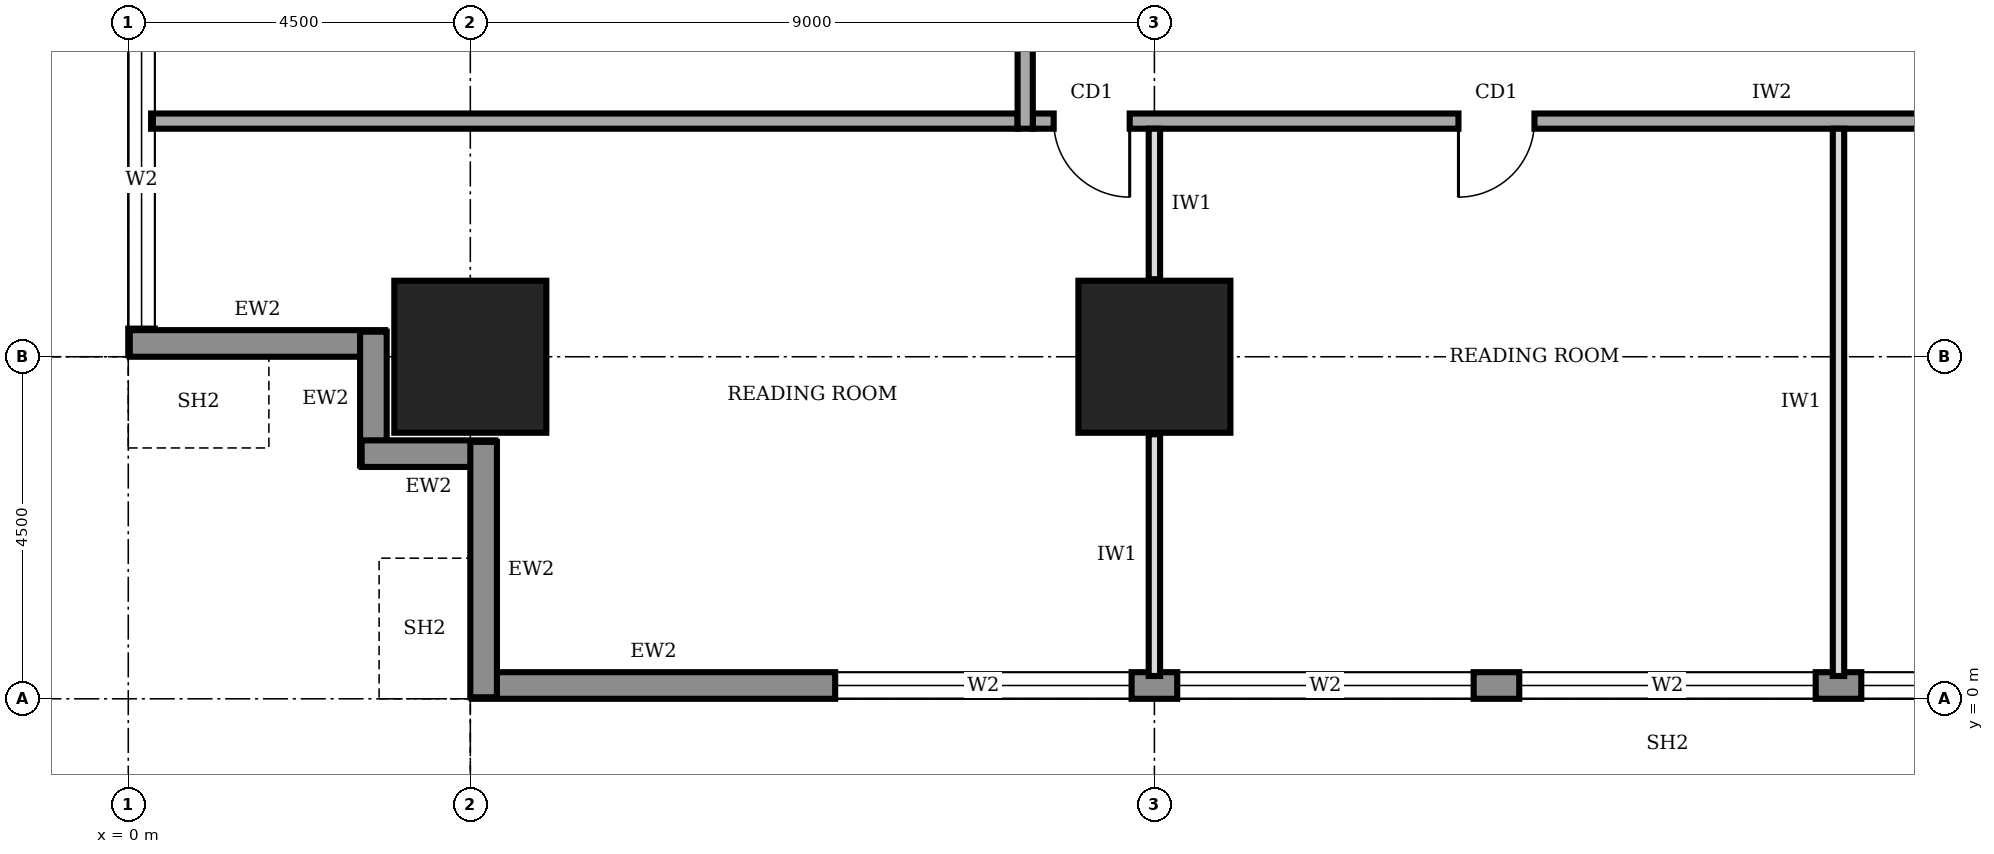
"""IFC4 building model, lengths in metres.
Left out: names, types, materials, properties, quantities, classifications, styles, units other than length and angle.
Written with IfcOpenShell. Run it as: python <this file> out.ifc"""

import sys

from ifc_helpers import new_model, si_unit, direction, frame, frame_2d, origin, origin_2d, place, context, subcontext, project, spatial, rectangle, extrude, element, fill, save


model = new_model("IFC4")
c1 = context("Model", 3, precision=1e-05, world=origin(), true_north=direction((0.0, 1.0)))
c2 = subcontext(c1, "Body", "Model", "MODEL_VIEW")
j1 = project(units=[si_unit("LENGTHUNIT", "METRE"), si_unit("PLANEANGLEUNIT", "RADIAN")], contexts=[c1])
p1 = place(None, origin())
s1 = spatial("IfcSite", under=j1, at=p1, CompositionType="ELEMENT")
p2 = place(p1, origin())
s2 = spatial("IfcBuilding", under=s1, at=p2, CompositionType="ELEMENT")
p3 = place(p2, frame((0.0, 0.0, 73.0)))
s3 = spatial("IfcBuildingStorey", under=s2, at=p3, CompositionType="ELEMENT", Elevation=73.0)
for number, where, z_axis, x_axis in (
    (1, (4.5, 4.5, 0.0), (0.0, 0.0, 1.0), (1.0, 0.0, 0.0)),
    (2, (13.5, 4.5, 0.0), (0.0, 0.0, 1.0), (1.0, 0.0, 0.0)),
):
    element("IfcColumn", number, at=place(p3, frame(where, z_axis=z_axis, x_axis=x_axis)), inside=s3, PredefinedType="COLUMN", context=c2, shape_type="SweptSolid", body=[
        extrude(rectangle(XDim=2.0, YDim=2.0, at=origin_2d()), origin(), (0.0, 0.0, 1.0), 4.0),
    ])
p4 = place(p3, frame((4.52, 0.175, 0.0), z_axis=(0.0, 0.0, 1.0), x_axis=(1.0, 0.0, 0.0)))
e3 = element("IfcWall", 3, at=p4, inside=s3, PredefinedType="STANDARD", context=c2, shape_type="SweptSolid", body=[
    extrude(rectangle(XDim=31.46, YDim=0.35, at=frame_2d((15.73, 0.0))), origin(), (0.0, 0.0, 1.0), 3.75),
])
p5 = place(p4, frame((4.78, 0.0, 0.6)))
e4 = element("IfcOpeningElement", 4, at=p5, cuts=e3, PredefinedType="OPENING", context=c2, shape_type="SweptSolid", body=[
    extrude(rectangle(XDim=3.9, YDim=2.6, at=frame_2d((1.95, 1.3))), frame((0.0, 0.185, 0.0), z_axis=(0.0, -1.0, 0.0), x_axis=(1.0, 0.0, 0.0)), (0.0, 0.0, 1.0), 0.37),
])
p6 = place(p4, frame((9.28, 0.0, 0.6)))
e5 = element("IfcOpeningElement", 5, at=p6, cuts=e3, PredefinedType="OPENING", context=c2, shape_type="SweptSolid", body=[
    extrude(rectangle(XDim=3.9, YDim=2.6, at=frame_2d((1.95, 1.3))), frame((0.0, 0.185, 0.0), z_axis=(0.0, -1.0, 0.0), x_axis=(1.0, 0.0, 0.0)), (0.0, 0.0, 1.0), 0.37),
])
p7 = place(p4, frame((13.78, 0.0, 0.6)))
e6 = element("IfcOpeningElement", 6, at=p7, cuts=e3, PredefinedType="OPENING", context=c2, shape_type="SweptSolid", body=[
    extrude(rectangle(XDim=3.9, YDim=2.6, at=frame_2d((1.95, 1.3))), frame((0.0, 0.185, 0.0), z_axis=(0.0, -1.0, 0.0), x_axis=(1.0, 0.0, 0.0)), (0.0, 0.0, 1.0), 0.37),
])
p8 = place(p4, frame((18.28, 0.0, 0.6)))
e7 = element("IfcOpeningElement", 7, at=p8, cuts=e3, PredefinedType="OPENING", context=c2, shape_type="SweptSolid", body=[
    extrude(rectangle(XDim=3.9, YDim=2.6, at=frame_2d((1.95, 1.3))), frame((0.0, 0.185, 0.0), z_axis=(0.0, -1.0, 0.0), x_axis=(1.0, 0.0, 0.0)), (0.0, 0.0, 1.0), 0.37),
])
p9 = place(p4, frame((22.78, 0.0, 0.6)))
e8 = element("IfcOpeningElement", 8, at=p9, cuts=e3, PredefinedType="OPENING", context=c2, shape_type="SweptSolid", body=[
    extrude(rectangle(XDim=3.9, YDim=2.6, at=frame_2d((1.95, 1.3))), frame((0.0, 0.185, 0.0), z_axis=(0.0, -1.0, 0.0), x_axis=(1.0, 0.0, 0.0)), (0.0, 0.0, 1.0), 0.37),
])
p10 = place(p4, frame((27.21, 0.0, 0.6)))
e9 = element("IfcOpeningElement", 9, at=p10, cuts=e3, PredefinedType="OPENING", context=c2, shape_type="SweptSolid", body=[
    extrude(rectangle(XDim=3.9, YDim=2.6, at=frame_2d((1.95, 1.3))), frame((0.0, 0.185, 0.0), z_axis=(0.0, -1.0, 0.0), x_axis=(1.0, 0.0, 0.0)), (0.0, 0.0, 1.0), 0.37),
])
p11 = place(p3, frame((0.175, 35.98, 0.0), z_axis=(0.0, 0.0, 1.0), x_axis=(0.0, -1.0, 0.0)))
e10 = element("IfcWall", 10, at=p11, inside=s3, PredefinedType="STANDARD", context=c2, shape_type="SweptSolid", body=[
    extrude(rectangle(XDim=31.46, YDim=0.35, at=frame_2d((15.73, 0.0))), origin(), (0.0, 0.0, 1.0), 3.75),
])
p12 = place(p11, frame((27.21, 0.0, 0.6)))
e11 = element("IfcOpeningElement", 11, at=p12, cuts=e10, PredefinedType="OPENING", context=c2, shape_type="SweptSolid", body=[
    extrude(rectangle(XDim=3.9, YDim=2.6, at=frame_2d((1.95, 1.3))), frame((0.0, 0.185, 0.0), z_axis=(0.0, -1.0, 0.0), x_axis=(1.0, 0.0, 0.0)), (0.0, 0.0, 1.0), 0.37),
])
p13 = place(p11, frame((22.78, 0.0, 0.6)))
e12 = element("IfcOpeningElement", 12, at=p13, cuts=e10, PredefinedType="OPENING", context=c2, shape_type="SweptSolid", body=[
    extrude(rectangle(XDim=3.9, YDim=2.6, at=frame_2d((1.95, 1.3))), frame((0.0, 0.185, 0.0), z_axis=(0.0, -1.0, 0.0), x_axis=(1.0, 0.0, 0.0)), (0.0, 0.0, 1.0), 0.37),
])
p14 = place(p11, frame((18.28, 0.0, 0.6)))
e13 = element("IfcOpeningElement", 13, at=p14, cuts=e10, PredefinedType="OPENING", context=c2, shape_type="SweptSolid", body=[
    extrude(rectangle(XDim=3.9, YDim=2.6, at=frame_2d((1.95, 1.3))), frame((0.0, 0.185, 0.0), z_axis=(0.0, -1.0, 0.0), x_axis=(1.0, 0.0, 0.0)), (0.0, 0.0, 1.0), 0.37),
])
p15 = place(p11, frame((13.78, 0.0, 0.6)))
e14 = element("IfcOpeningElement", 14, at=p15, cuts=e10, PredefinedType="OPENING", context=c2, shape_type="SweptSolid", body=[
    extrude(rectangle(XDim=3.9, YDim=2.6, at=frame_2d((1.95, 1.3))), frame((0.0, 0.185, 0.0), z_axis=(0.0, -1.0, 0.0), x_axis=(1.0, 0.0, 0.0)), (0.0, 0.0, 1.0), 0.37),
])
p16 = place(p11, frame((9.28, 0.0, 0.6)))
e15 = element("IfcOpeningElement", 15, at=p16, cuts=e10, PredefinedType="OPENING", context=c2, shape_type="SweptSolid", body=[
    extrude(rectangle(XDim=3.9, YDim=2.6, at=frame_2d((1.95, 1.3))), frame((0.0, 0.185, 0.0), z_axis=(0.0, -1.0, 0.0), x_axis=(1.0, 0.0, 0.0)), (0.0, 0.0, 1.0), 0.37),
])
p17 = place(p11, frame((4.78, 0.0, 0.6)))
e16 = element("IfcOpeningElement", 16, at=p17, cuts=e10, PredefinedType="OPENING", context=c2, shape_type="SweptSolid", body=[
    extrude(rectangle(XDim=3.9, YDim=2.6, at=frame_2d((1.95, 1.3))), frame((0.0, 0.185, 0.0), z_axis=(0.0, -1.0, 0.0), x_axis=(1.0, 0.0, 0.0)), (0.0, 0.0, 1.0), 0.37),
])
p18 = place(p3, frame((0.02, 4.675, 0.0), z_axis=(0.0, 0.0, 1.0), x_axis=(1.0, 0.0, 0.0)))
e17 = element("IfcWall", 17, at=p18, inside=s3, PredefinedType="STANDARD", context=c2, shape_type="SweptSolid", body=[
    extrude(rectangle(XDim=3.36, YDim=0.35, at=frame_2d((1.68, 0.0))), origin(), (0.0, 0.0, 1.0), 2.75),
])
for number, where, z_axis, x_axis in (
    (18, (3.225, 4.83, 0.0), (0.0, 0.0, 1.0), (0.0, -1.0, 0.0)),
    (19, (3.07, 3.225, 0.0), (0.0, 0.0, 1.0), (1.0, 0.0, 0.0)),
):
    element("IfcWall", number, at=place(p3, frame(where, z_axis=z_axis, x_axis=x_axis)), inside=s3, PredefinedType="STANDARD", context=c2, shape_type="SweptSolid", body=[
        extrude(rectangle(XDim=1.76, YDim=0.35, at=frame_2d((0.88, 0.0))), origin(), (0.0, 0.0, 1.0), 3.75),
    ])
p19 = place(p3, frame((4.675, 3.38, 0.0), z_axis=(0.0, 0.0, 1.0), x_axis=(0.0, -1.0, 0.0)))
e20 = element("IfcWall", 20, at=p19, inside=s3, PredefinedType="STANDARD", context=c2, shape_type="SweptSolid", body=[
    extrude(rectangle(XDim=3.36, YDim=0.35, at=frame_2d((1.68, 0.0))), origin(), (0.0, 0.0, 1.0), 2.75),
])
p20 = place(p3, frame((11.9, 7.6, 0.0), z_axis=(0.0, 0.0, 1.0), x_axis=(1.0, 0.0, 0.0)))
e21 = element("IfcWall", 21, at=p20, inside=s3, PredefinedType="SOLIDWALL", context=c2, shape_type="SweptSolid", body=[
    extrude(rectangle(XDim=16.9, YDim=0.2, at=frame_2d((8.45, 0.0))), origin(), (0.0, 0.0, 1.0), 3.75),
])
p21 = place(p20, frame((0.275, 0.0, 0.0)))
e22 = element("IfcOpeningElement", 22, at=p21, cuts=e21, PredefinedType="OPENING", context=c2, shape_type="SweptSolid", body=[
    extrude(rectangle(XDim=1.0, YDim=2.1, at=frame_2d((0.5, 1.05))), frame((0.0, 0.11, 0.0), z_axis=(0.0, -1.0, 0.0), x_axis=(1.0, 0.0, 0.0)), (0.0, 0.0, 1.0), 0.22),
])
p22 = place(p20, frame((5.6, 0.0, 0.0)))
e23 = element("IfcOpeningElement", 23, at=p22, cuts=e21, PredefinedType="OPENING", context=c2, shape_type="SweptSolid", body=[
    extrude(rectangle(XDim=1.0, YDim=2.1, at=frame_2d((0.5, 1.05))), frame((0.0, 0.11, 0.0), z_axis=(0.0, -1.0, 0.0), x_axis=(1.0, 0.0, 0.0)), (0.0, 0.0, 1.0), 0.22),
])
p23 = place(p20, frame((12.85, 0.0, 0.0)))
e24 = element("IfcOpeningElement", 24, at=p23, cuts=e21, PredefinedType="OPENING", context=c2, shape_type="SweptSolid", body=[
    extrude(rectangle(XDim=1.8, YDim=2.1, at=frame_2d((0.9, 1.05))), frame((0.0, 0.11, 0.0), z_axis=(0.0, -1.0, 0.0), x_axis=(1.0, 0.0, 0.0)), (0.0, 0.0, 1.0), 0.22),
])
p24 = place(p3, frame((11.8, 32.8, 0.0), z_axis=(0.0, 0.0, 1.0), x_axis=(0.0, -1.0, 0.0)))
e25 = element("IfcWall", 25, at=p24, inside=s3, PredefinedType="SOLIDWALL", context=c2, shape_type="SweptSolid", body=[
    extrude(rectangle(XDim=25.3, YDim=0.2, at=frame_2d((12.65, 0.0))), origin(), (0.0, 0.0, 1.0), 3.75),
])
p25 = place(p24, frame((21.8, 0.0, 0.0)))
e26 = element("IfcOpeningElement", 26, at=p25, cuts=e25, PredefinedType="OPENING", context=c2, shape_type="SweptSolid", body=[
    extrude(rectangle(XDim=1.0, YDim=2.1, at=frame_2d((0.5, 1.05))), frame((0.0, 0.11, 0.0), z_axis=(0.0, -1.0, 0.0), x_axis=(1.0, 0.0, 0.0)), (0.0, 0.0, 1.0), 0.22),
])
p26 = place(p24, frame((17.65, 0.0, 0.0)))
e27 = element("IfcOpeningElement", 27, at=p26, cuts=e25, PredefinedType="OPENING", context=c2, shape_type="SweptSolid", body=[
    extrude(rectangle(XDim=0.9, YDim=2.1, at=frame_2d((0.45, 1.05))), frame((0.0, 0.11, 0.0), z_axis=(0.0, -1.0, 0.0), x_axis=(1.0, 0.0, 0.0)), (0.0, 0.0, 1.0), 0.22),
])
p27 = place(p24, frame((14.45, 0.0, 0.0)))
e28 = element("IfcOpeningElement", 28, at=p27, cuts=e25, PredefinedType="OPENING", context=c2, shape_type="SweptSolid", body=[
    extrude(rectangle(XDim=0.9, YDim=2.1, at=frame_2d((0.45, 1.05))), frame((0.0, 0.11, 0.0), z_axis=(0.0, -1.0, 0.0), x_axis=(1.0, 0.0, 0.0)), (0.0, 0.0, 1.0), 0.22),
])
p28 = place(p24, frame((8.9, 0.0, 0.0)))
e29 = element("IfcOpeningElement", 29, at=p28, cuts=e25, PredefinedType="OPENING", context=c2, shape_type="SweptSolid", body=[
    extrude(rectangle(XDim=0.9, YDim=2.1, at=frame_2d((0.45, 1.05))), frame((0.0, 0.11, 0.0), z_axis=(0.0, -1.0, 0.0), x_axis=(1.0, 0.0, 0.0)), (0.0, 0.0, 1.0), 0.22),
])
p29 = place(p24, frame((6.3, 0.0, 0.0)))
e30 = element("IfcOpeningElement", 30, at=p29, cuts=e25, PredefinedType="OPENING", context=c2, shape_type="SweptSolid", body=[
    extrude(rectangle(XDim=1.0, YDim=2.1, at=frame_2d((0.5, 1.05))), frame((0.0, 0.11, 0.0), z_axis=(0.0, -1.0, 0.0), x_axis=(1.0, 0.0, 0.0)), (0.0, 0.0, 1.0), 0.22),
])
p30 = place(p24, frame((11.4, 0.0, 0.0)))
e31 = element("IfcOpeningElement", 31, at=p30, cuts=e25, PredefinedType="OPENING", context=c2, shape_type="SweptSolid", body=[
    extrude(rectangle(XDim=1.0, YDim=2.1, at=frame_2d((0.5, 1.05))), frame((0.0, 0.11, 0.0), z_axis=(0.0, -1.0, 0.0), x_axis=(1.0, 0.0, 0.0)), (0.0, 0.0, 1.0), 0.22),
])
p31 = place(p24, frame((2.3, 0.0, 0.0)))
e32 = element("IfcOpeningElement", 32, at=p31, cuts=e25, PredefinedType="OPENING", context=c2, shape_type="SweptSolid", body=[
    extrude(rectangle(XDim=1.0, YDim=2.1, at=frame_2d((0.5, 1.05))), frame((0.0, 0.11, 0.0), z_axis=(0.0, -1.0, 0.0), x_axis=(1.0, 0.0, 0.0)), (0.0, 0.0, 1.0), 0.22),
])
p32 = place(p3, frame((0.3, 7.6, 0.0), z_axis=(0.0, 0.0, 1.0), x_axis=(1.0, 0.0, 0.0)))
e33 = element("IfcWall", 33, at=p32, inside=s3, PredefinedType="SOLIDWALL", context=c2, shape_type="SweptSolid", body=[
    extrude(rectangle(XDim=11.4, YDim=0.2, at=frame_2d((5.7, 0.0))), origin(), (0.0, 0.0, 1.0), 3.75),
])
p33 = place(p3, frame((13.5, 0.3, 0.0), z_axis=(0.0, 0.0, 1.0), x_axis=(0.0, 1.0, 0.0)))
e34 = element("IfcWall", 34, at=p33, inside=s3, PredefinedType="PARTITIONING", context=c2, shape_type="SweptSolid", body=[
    extrude(rectangle(XDim=3.18, YDim=0.15, at=frame_2d((1.59, 0.0))), origin(), (0.0, 0.0, 1.0), 2.75),
])
p34 = place(p3, frame((13.5, 5.52, 0.0), z_axis=(0.0, 0.0, 1.0), x_axis=(0.0, 1.0, 0.0)))
e35 = element("IfcWall", 35, at=p34, inside=s3, PredefinedType="PARTITIONING", context=c2, shape_type="SweptSolid", body=[
    extrude(rectangle(XDim=1.98, YDim=0.15, at=frame_2d((0.99, 0.0))), origin(), (0.0, 0.0, 1.0), 3.75),
])
p35 = place(p3, frame((22.5, 0.3, 0.0), z_axis=(0.0, 0.0, 1.0), x_axis=(0.0, 1.0, 0.0)))
e36 = element("IfcWall", 36, at=p35, inside=s3, PredefinedType="PARTITIONING", context=c2, shape_type="SweptSolid", body=[
    extrude(rectangle(XDim=7.2, YDim=0.15, at=frame_2d((3.6, 0.0))), origin(), (0.0, 0.0, 1.0), 3.75),
])
p36 = place(p5, origin())
e37 = element("IfcWindow", 37, at=p36, inside=s3, PartitioningType="SINGLE_PANEL", PredefinedType="WINDOW", context=c2, shape_type="SweptSolid", body=[
    extrude(rectangle(XDim=3.9, YDim=2.6, at=frame_2d((1.95, 1.3))), frame((0.0, 0.03, 0.0), z_axis=(0.0, -1.0, 0.0), x_axis=(1.0, 0.0, 0.0)), (0.0, 0.0, 1.0), 0.06),
])
fill(e4, e37)
p37 = place(p6, origin())
e38 = element("IfcWindow", 38, at=p37, inside=s3, PartitioningType="SINGLE_PANEL", PredefinedType="WINDOW", context=c2, shape_type="SweptSolid", body=[
    extrude(rectangle(XDim=3.9, YDim=2.6, at=frame_2d((1.95, 1.3))), frame((0.0, 0.03, 0.0), z_axis=(0.0, -1.0, 0.0), x_axis=(1.0, 0.0, 0.0)), (0.0, 0.0, 1.0), 0.06),
])
fill(e5, e38)
p38 = place(p7, origin())
e39 = element("IfcWindow", 39, at=p38, inside=s3, PartitioningType="SINGLE_PANEL", PredefinedType="WINDOW", context=c2, shape_type="SweptSolid", body=[
    extrude(rectangle(XDim=3.9, YDim=2.6, at=frame_2d((1.95, 1.3))), frame((0.0, 0.03, 0.0), z_axis=(0.0, -1.0, 0.0), x_axis=(1.0, 0.0, 0.0)), (0.0, 0.0, 1.0), 0.06),
])
fill(e6, e39)
p39 = place(p8, origin())
e40 = element("IfcWindow", 40, at=p39, inside=s3, PartitioningType="SINGLE_PANEL", PredefinedType="WINDOW", context=c2, shape_type="SweptSolid", body=[
    extrude(rectangle(XDim=3.9, YDim=2.6, at=frame_2d((1.95, 1.3))), frame((0.0, 0.03, 0.0), z_axis=(0.0, -1.0, 0.0), x_axis=(1.0, 0.0, 0.0)), (0.0, 0.0, 1.0), 0.06),
])
fill(e7, e40)
p40 = place(p12, origin())
e41 = element("IfcWindow", 41, at=p40, inside=s3, PartitioningType="SINGLE_PANEL", PredefinedType="WINDOW", context=c2, shape_type="SweptSolid", body=[
    extrude(rectangle(XDim=3.9, YDim=2.6, at=frame_2d((1.95, 1.3))), frame((0.0, 0.03, 0.0), z_axis=(0.0, -1.0, 0.0), x_axis=(1.0, 0.0, 0.0)), (0.0, 0.0, 1.0), 0.06),
])
fill(e11, e41)
p41 = place(p21, frame((1.0, 0.0, 0.0), z_axis=(0.0, 0.0, 1.0), x_axis=(-1.0, 0.0, 0.0)))
e42 = element("IfcDoor", 42, at=p41, inside=s3, OperationType="SINGLE_SWING_LEFT", PredefinedType="DOOR", context=c2, shape_type="SweptSolid", body=[
    extrude(rectangle(XDim=1.0, YDim=2.1, at=frame_2d((0.5, 1.05))), frame((0.0, 0.025, 0.0), z_axis=(0.0, -1.0, 0.0), x_axis=(1.0, 0.0, 0.0)), (0.0, 0.0, 1.0), 0.05),
])
fill(e22, e42)
p42 = place(p22, frame((1.0, 0.0, 0.0), z_axis=(0.0, 0.0, 1.0), x_axis=(-1.0, 0.0, 0.0)))
e43 = element("IfcDoor", 43, at=p42, inside=s3, OperationType="SINGLE_SWING_RIGHT", PredefinedType="DOOR", context=c2, shape_type="SweptSolid", body=[
    extrude(rectangle(XDim=1.0, YDim=2.1, at=frame_2d((0.5, 1.05))), frame((0.0, 0.025, 0.0), z_axis=(0.0, -1.0, 0.0), x_axis=(1.0, 0.0, 0.0)), (0.0, 0.0, 1.0), 0.05),
])
fill(e23, e43)
save(model, sys.argv[1])
